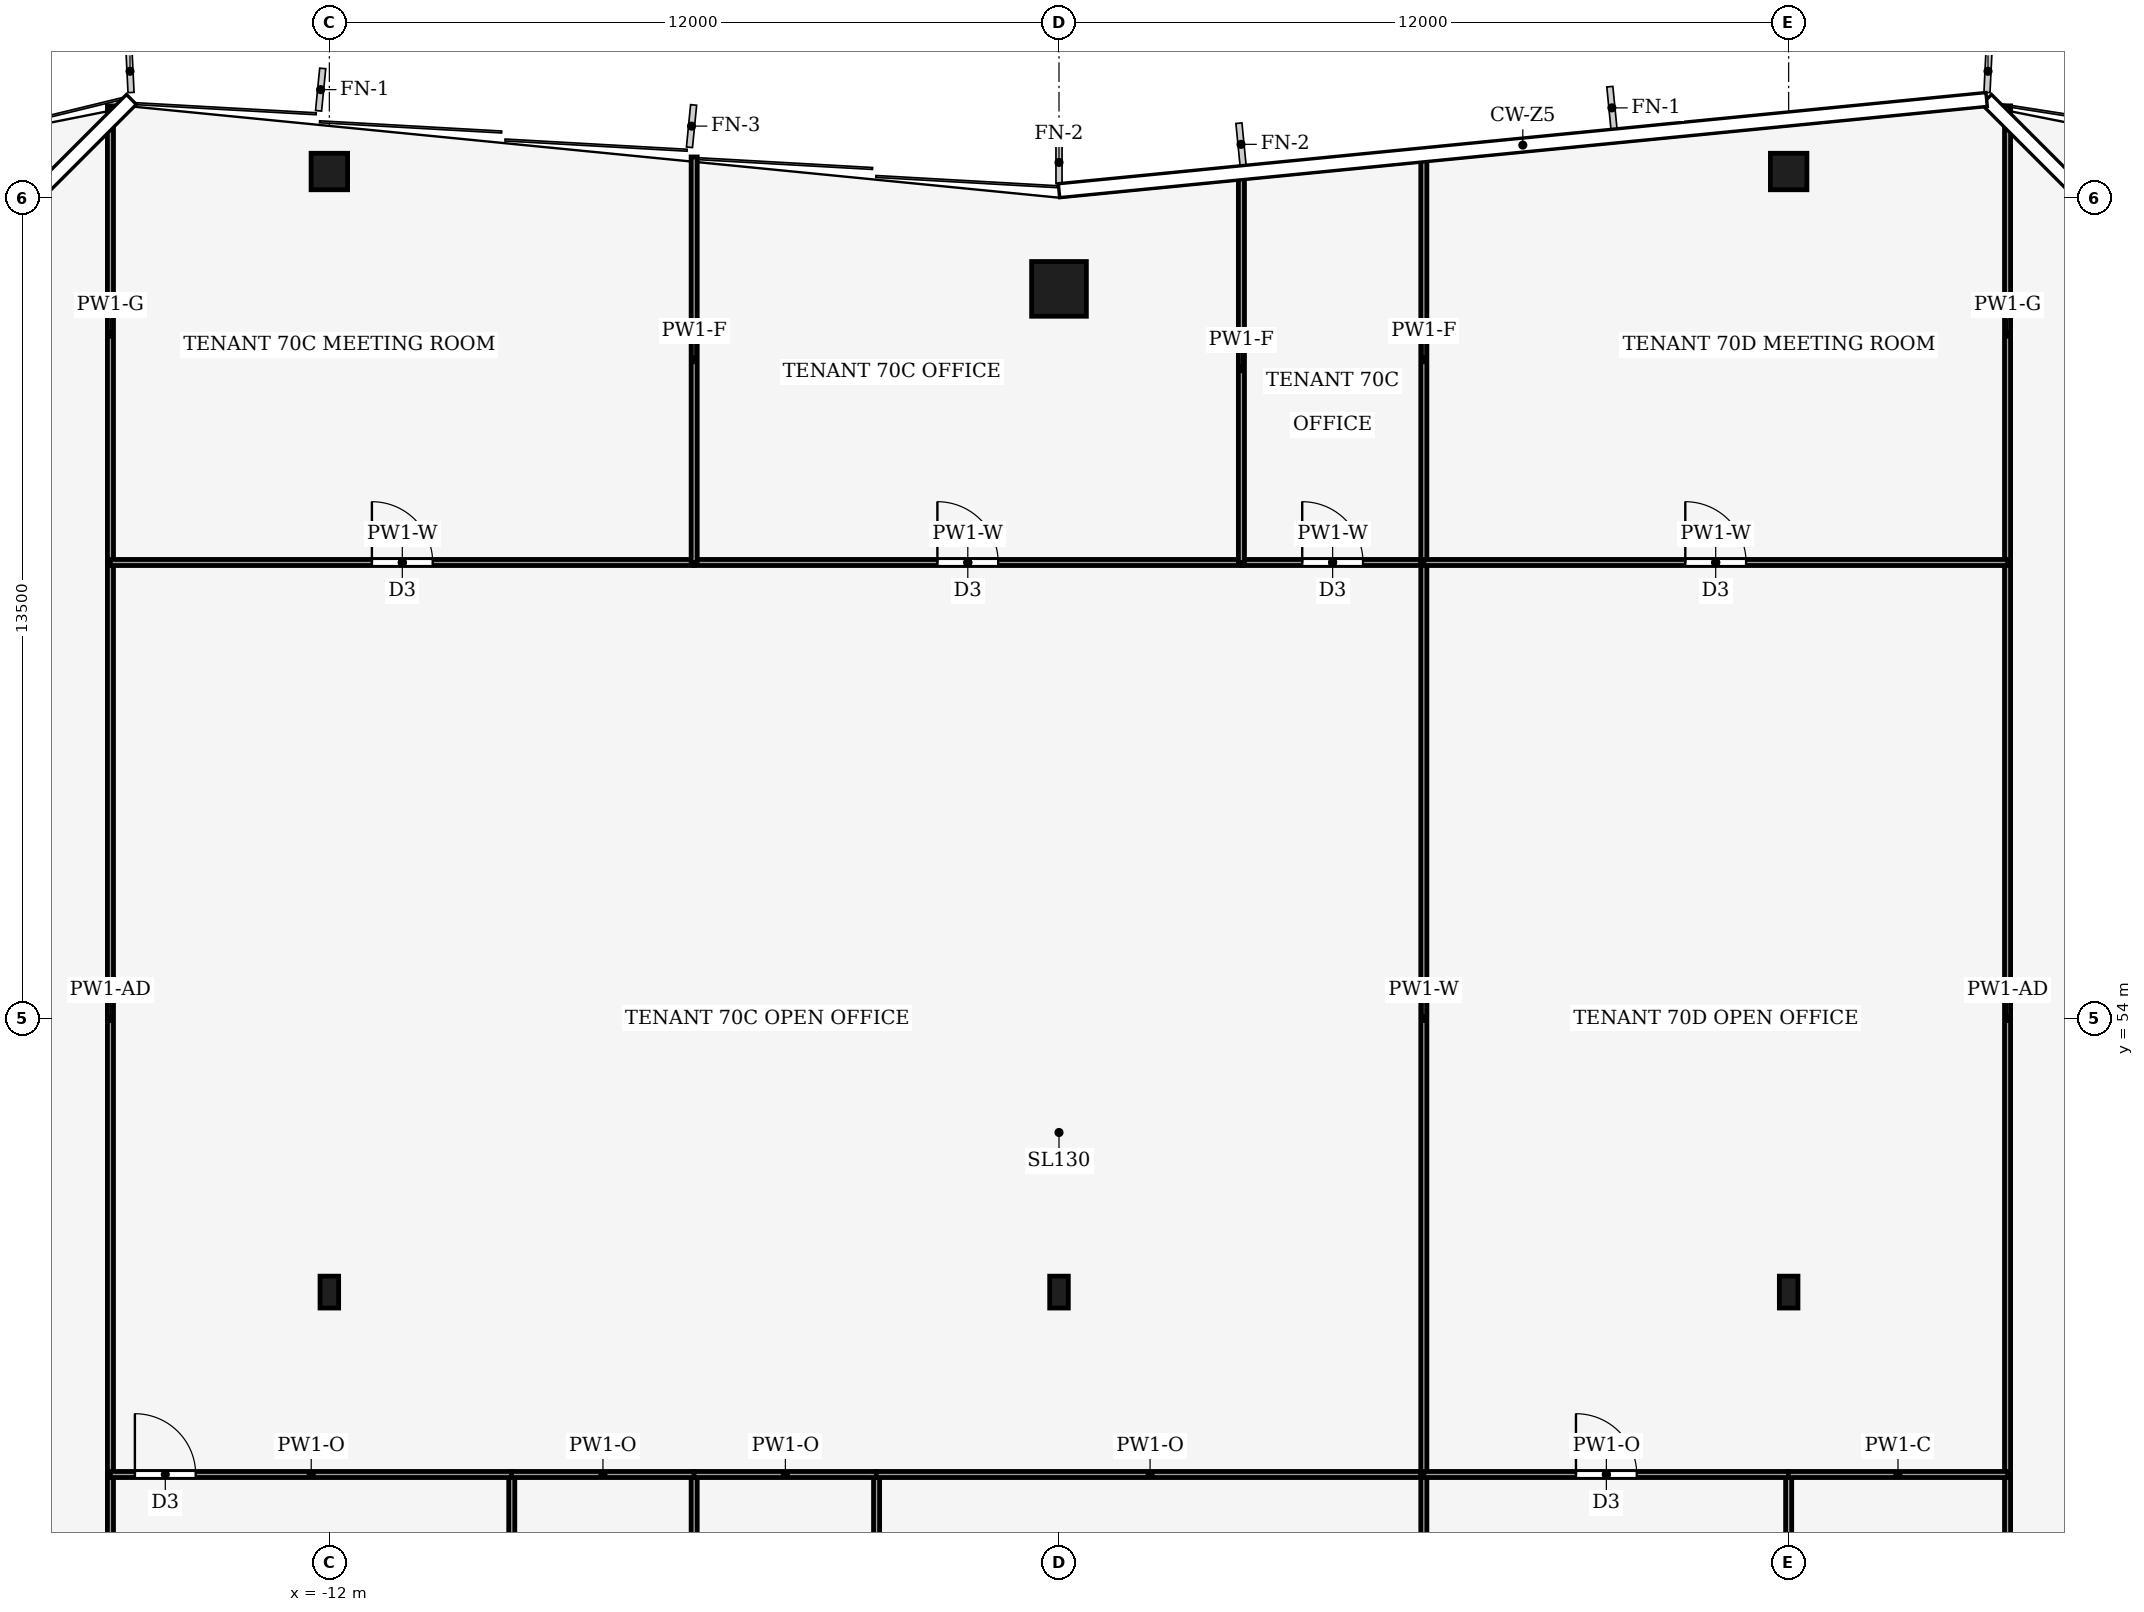
"""IFC4 building model, lengths in metres.
Left out: names, types, materials, properties, quantities, classifications, styles, units other than length and angle.
Written with IfcOpenShell. Run it as: python <this file> out.ifc"""

import sys

from ifc_helpers import new_model, si_unit, direction, frame, frame_2d, origin, origin_2d, place, context, subcontext, project, spatial, rectangle, hollow_rectangle, i_section, extrude, element, fill, save


model = new_model("IFC4")
c1 = context("Model", 3, precision=1e-05, world=origin(), true_north=direction((0.0, 1.0)))
c2 = subcontext(c1, "Body", "Model", "MODEL_VIEW")
j1 = project(units=[si_unit("LENGTHUNIT", "METRE"), si_unit("PLANEANGLEUNIT", "RADIAN")], contexts=[c1])
p1 = place(None, origin())
s1 = spatial("IfcSite", under=j1, at=p1, CompositionType="ELEMENT")
p2 = place(p1, origin())
s2 = spatial("IfcBuilding", under=s1, at=p2, CompositionType="ELEMENT")
p3 = place(p2, frame((0.0, 0.0, 306.0)))
s3 = spatial("IfcBuildingStorey", under=s2, at=p3, CompositionType="ELEMENT", Elevation=306.0)
p4 = place(p3, frame((0.0, 66.0, 0.0), z_axis=(0.0, 0.0, 1.0), x_axis=(1.0, 0.0, 0.0)))
e1 = element("IfcColumn", 1, at=p4, inside=s3, PredefinedType="COLUMN", context=c2, shape_type="SweptSolid", body=[
    extrude(hollow_rectangle(XDim=0.9, YDim=0.9, WallThickness=0.04, at=origin_2d()), origin(), (0.0, 0.0, 1.0), 4.0),
])
for number, where, z_axis, x_axis in (
    (2, (-12.0, 67.93, 0.0), (0.0, 0.0, 1.0), (1.0, 0.0, 0.0)),
    (3, (12.0, 67.93, 0.0), (0.0, 0.0, 1.0), (1.0, 0.0, 0.0)),
):
    element("IfcColumn", number, at=place(p3, frame(where, z_axis=z_axis, x_axis=x_axis)), inside=s3, PredefinedType="COLUMN", context=c2, shape_type="SweptSolid", body=[
        extrude(hollow_rectangle(XDim=0.6, YDim=0.6, WallThickness=0.025, at=origin_2d()), origin(), (0.0, 0.0, 1.0), 4.0),
    ])
for number, where, z_axis, x_axis in (
    (4, (-12.0, 49.5, 0.0), (0.0, 0.0, 1.0), (1.0, 0.0, 0.0)),
    (5, (0.0, 49.5, 0.0), (0.0, 0.0, 1.0), (1.0, 0.0, 0.0)),
    (6, (12.0, 49.5, 0.0), (0.0, 0.0, 1.0), (1.0, 0.0, 0.0)),
):
    element("IfcColumn", number, at=place(p3, frame(where, z_axis=z_axis, x_axis=x_axis)), inside=s3, PredefinedType="COLUMN", context=c2, shape_type="SweptSolid", body=[
        extrude(i_section(OverallWidth=0.306, OverallDepth=0.524, WebThickness=0.012, FlangeThickness=0.04, FilletRadius=0.027, at=origin_2d()), origin(), (0.0, 0.0, 1.0), 4.0),
    ])
p5 = place(p3, frame((-15.6, 40.6, 0.0), z_axis=(0.0, 0.0, 1.0), x_axis=(0.0, 1.0, 0.0)))
e7 = element("IfcWall", 7, at=p5, inside=s3, PredefinedType="PARTITIONING", context=c2, shape_type="SweptSolid", body=[
    extrude(rectangle(XDim=5.9, YDim=0.1, at=frame_2d((2.95, 0.0))), origin(), (0.0, 0.0, 1.0), 3.87),
])
p6 = place(p3, frame((-15.6, 46.5, 0.0), z_axis=(0.0, 0.0, 1.0), x_axis=(0.0, 1.0, 0.0)))
e8 = element("IfcWall", 8, at=p6, inside=s3, PredefinedType="PARTITIONING", context=c2, shape_type="SweptSolid", body=[
    extrude(rectangle(XDim=15.0, YDim=0.1, at=frame_2d((7.5, 0.0))), origin(), (0.0, 0.0, 1.0), 3.35),
])
p7 = place(p3, frame((-15.6, 61.5, 0.0), z_axis=(0.0, 0.0, 1.0), x_axis=(0.0, 1.0, 0.0)))
e9 = element("IfcWall", 9, at=p7, inside=s3, PredefinedType="PARTITIONING", context=c2, shape_type="SweptSolid", body=[
    extrude(rectangle(XDim=7.51, YDim=0.1, at=frame_2d((3.755, 0.0))), origin(), (0.0, 0.0, 1.0), 2.93),
])
p8 = place(p3, frame((15.6, 46.5, 0.0), z_axis=(0.0, 0.0, 1.0), x_axis=(0.0, -1.0, 0.0)))
e10 = element("IfcWall", 10, at=p8, inside=s3, PredefinedType="PARTITIONING", context=c2, shape_type="SweptSolid", body=[
    extrude(rectangle(XDim=5.9, YDim=0.1, at=frame_2d((2.95, 0.0))), origin(), (0.0, 0.0, 1.0), 3.87),
])
p9 = place(p3, frame((15.6, 61.5, 0.0), z_axis=(0.0, 0.0, 1.0), x_axis=(0.0, -1.0, 0.0)))
e11 = element("IfcWall", 11, at=p9, inside=s3, PredefinedType="PARTITIONING", context=c2, shape_type="SweptSolid", body=[
    extrude(rectangle(XDim=15.0, YDim=0.1, at=frame_2d((7.5, 0.0))), origin(), (0.0, 0.0, 1.0), 3.35),
])
p10 = place(p3, frame((15.6, 69.01, 0.0), z_axis=(0.0, 0.0, 1.0), x_axis=(0.0, -1.0, 0.0)))
e12 = element("IfcWall", 12, at=p10, inside=s3, PredefinedType="PARTITIONING", context=c2, shape_type="SweptSolid", body=[
    extrude(rectangle(XDim=7.51, YDim=0.1, at=frame_2d((3.755, 0.0))), origin(), (0.0, 0.0, 1.0), 2.93),
])
p11 = place(p3, frame((-9.0, 46.5, 0.0), z_axis=(0.0, 0.0, 1.0), x_axis=(0.0, -1.0, 0.0)))
e13 = element("IfcWall", 13, at=p11, inside=s3, PredefinedType="PARTITIONING", context=c2, shape_type="SweptSolid", body=[
    extrude(rectangle(XDim=5.9, YDim=0.1, at=frame_2d((2.95, 0.0))), origin(), (0.0, 0.0, 1.0), 3.87),
])
p12 = place(p11, frame((2.45, 0.0, 0.0)))
e14 = element("IfcOpeningElement", 14, at=p12, cuts=e13, PredefinedType="OPENING", context=c2, shape_type="SweptSolid", body=[
    extrude(rectangle(XDim=1.0, YDim=2.1, at=frame_2d((0.5, 1.05))), frame((0.0, 0.06, 0.0), z_axis=(0.0, -1.0, 0.0), x_axis=(1.0, 0.0, 0.0)), (0.0, 0.0, 1.0), 0.12),
])
p13 = place(p3, frame((-15.6, 46.5, 0.0), z_axis=(0.0, 0.0, 1.0), x_axis=(1.0, 0.0, 0.0)))
e15 = element("IfcWall", 15, at=p13, inside=s3, PredefinedType="PARTITIONING", context=c2, shape_type="SweptSolid", body=[
    extrude(rectangle(XDim=6.604, YDim=0.1, at=frame_2d((3.302, 0.0))), origin(), (0.0, 0.0, 1.0), 3.39),
])
p14 = place(p13, frame((0.402, 0.0, 0.0)))
e16 = element("IfcOpeningElement", 16, at=p14, cuts=e15, PredefinedType="OPENING", context=c2, shape_type="SweptSolid", body=[
    extrude(rectangle(XDim=1.0, YDim=2.1, at=frame_2d((0.5, 1.05))), frame((0.0, 0.06, 0.0), z_axis=(0.0, -1.0, 0.0), x_axis=(1.0, 0.0, 0.0)), (0.0, 0.0, 1.0), 0.12),
])
p15 = place(p3, frame((-6.0, 46.5, 0.0), z_axis=(0.0, 0.0, 1.0), x_axis=(0.0, -1.0, 0.0)))
e17 = element("IfcWall", 17, at=p15, inside=s3, PredefinedType="PARTITIONING", context=c2, shape_type="SweptSolid", body=[
    extrude(rectangle(XDim=5.9, YDim=0.1, at=frame_2d((2.95, 0.0))), origin(), (0.0, 0.0, 1.0), 3.87),
])
p16 = place(p15, frame((2.45, 0.0, 0.0)))
e18 = element("IfcOpeningElement", 18, at=p16, cuts=e17, PredefinedType="OPENING", context=c2, shape_type="SweptSolid", body=[
    extrude(rectangle(XDim=1.0, YDim=2.1, at=frame_2d((0.5, 1.05))), frame((0.0, 0.06, 0.0), z_axis=(0.0, -1.0, 0.0), x_axis=(1.0, 0.0, 0.0)), (0.0, 0.0, 1.0), 0.12),
])
p17 = place(p3, frame((-5.996, 46.5, 0.0), z_axis=(0.0, 0.0, 1.0), x_axis=(-1.0, 0.0, 0.0)))
e19 = element("IfcWall", 19, at=p17, inside=s3, PredefinedType="PARTITIONING", context=c2, shape_type="SweptSolid", body=[
    extrude(rectangle(XDim=3.008, YDim=0.1, at=frame_2d((1.504, 0.0))), origin(), (0.0, 0.0, 1.0), 3.39),
])
p18 = place(p3, frame((-3.0, 40.6, 0.0), z_axis=(0.0, 0.0, 1.0), x_axis=(0.0, 1.0, 0.0)))
e20 = element("IfcWall", 20, at=p18, inside=s3, PredefinedType="PARTITIONING", context=c2, shape_type="SweptSolid", body=[
    extrude(rectangle(XDim=5.9, YDim=0.1, at=frame_2d((2.95, 0.0))), origin(), (0.0, 0.0, 1.0), 3.87),
])
p19 = place(p3, frame((-2.996, 46.5, 0.0), z_axis=(0.0, 0.0, 1.0), x_axis=(-1.0, 0.0, 0.0)))
e21 = element("IfcWall", 21, at=p19, inside=s3, PredefinedType="PARTITIONING", context=c2, shape_type="SweptSolid", body=[
    extrude(rectangle(XDim=3.008, YDim=0.1, at=frame_2d((1.504, 0.0))), origin(), (0.0, 0.0, 1.0), 3.39),
])
p20 = place(p3, frame((6.0, 46.5, 0.0), z_axis=(0.0, 0.0, 1.0), x_axis=(-1.0, 0.0, 0.0)))
e22 = element("IfcWall", 22, at=p20, inside=s3, PredefinedType="PARTITIONING", context=c2, shape_type="SweptSolid", body=[
    extrude(rectangle(XDim=9.004, YDim=0.1, at=frame_2d((4.502, 0.0))), origin(), (0.0, 0.0, 1.0), 3.39),
])
p21 = place(p3, frame((6.0, 40.6, 0.0), z_axis=(0.0, 0.0, 1.0), x_axis=(0.0, 1.0, 0.0)))
e23 = element("IfcWall", 23, at=p21, inside=s3, PredefinedType="PARTITIONING", context=c2, shape_type="SweptSolid", body=[
    extrude(rectangle(XDim=5.9, YDim=0.1, at=frame_2d((2.95, 0.0))), origin(), (0.0, 0.0, 1.0), 3.87),
])
p22 = place(p3, frame((-15.6, 61.5, 0.0), z_axis=(0.0, 0.0, 1.0), x_axis=(1.0, 0.0, 0.0)))
e24 = element("IfcWall", 24, at=p22, inside=s3, PredefinedType="PARTITIONING", context=c2, shape_type="SweptSolid", body=[
    extrude(rectangle(XDim=9.6, YDim=0.1, at=frame_2d((4.8, 0.0))), origin(), (0.0, 0.0, 1.0), 3.24),
])
p23 = place(p22, frame((4.3, 0.0, 0.0)))
e25 = element("IfcOpeningElement", 25, at=p23, cuts=e24, PredefinedType="OPENING", context=c2, shape_type="SweptSolid", body=[
    extrude(rectangle(XDim=1.0, YDim=2.1, at=frame_2d((0.5, 1.05))), frame((0.0, 0.06, 0.0), z_axis=(0.0, -1.0, 0.0), x_axis=(1.0, 0.0, 0.0)), (0.0, 0.0, 1.0), 0.12),
])
p24 = place(p3, frame((-6.0, 61.5, 0.0), z_axis=(0.0, 0.0, 1.0), x_axis=(1.0, 0.0, 0.0)))
e26 = element("IfcWall", 26, at=p24, inside=s3, PredefinedType="PARTITIONING", context=c2, shape_type="SweptSolid", body=[
    extrude(rectangle(XDim=9.0, YDim=0.1, at=frame_2d((4.5, 0.0))), origin(), (0.0, 0.0, 1.0), 3.24),
])
p25 = place(p24, frame((4.0, 0.0, 0.0)))
e27 = element("IfcOpeningElement", 27, at=p25, cuts=e26, PredefinedType="OPENING", context=c2, shape_type="SweptSolid", body=[
    extrude(rectangle(XDim=1.0, YDim=2.1, at=frame_2d((0.5, 1.05))), frame((0.0, 0.06, 0.0), z_axis=(0.0, -1.0, 0.0), x_axis=(1.0, 0.0, 0.0)), (0.0, 0.0, 1.0), 0.12),
])
p26 = place(p3, frame((3.0, 61.5, 0.0), z_axis=(0.0, 0.0, 1.0), x_axis=(1.0, 0.0, 0.0)))
e28 = element("IfcWall", 28, at=p26, inside=s3, PredefinedType="PARTITIONING", context=c2, shape_type="SweptSolid", body=[
    extrude(rectangle(XDim=3.0, YDim=0.1, at=frame_2d((1.5, 0.0))), origin(), (0.0, 0.0, 1.0), 3.24),
])
p27 = place(p26, frame((1.0, 0.0, 0.0)))
e29 = element("IfcOpeningElement", 29, at=p27, cuts=e28, PredefinedType="OPENING", context=c2, shape_type="SweptSolid", body=[
    extrude(rectangle(XDim=1.0, YDim=2.1, at=frame_2d((0.5, 1.05))), frame((0.0, 0.06, 0.0), z_axis=(0.0, -1.0, 0.0), x_axis=(1.0, 0.0, 0.0)), (0.0, 0.0, 1.0), 0.12),
])
p28 = place(p3, frame((6.0, 46.5, 0.0), z_axis=(0.0, 0.0, 1.0), x_axis=(0.0, 1.0, 0.0)))
e30 = element("IfcWall", 30, at=p28, inside=s3, PredefinedType="PARTITIONING", context=c2, shape_type="SweptSolid", body=[
    extrude(rectangle(XDim=15.0, YDim=0.1, at=frame_2d((7.5, 0.0))), origin(), (0.0, 0.0, 1.0), 3.24),
])
p29 = place(p3, frame((-6.0, 61.5, 0.0), z_axis=(0.0, 0.0, 1.0), x_axis=(0.0, 1.0, 0.0)))
e31 = element("IfcWall", 31, at=p29, inside=s3, PredefinedType="PARTITIONING", context=c2, shape_type="SweptSolid", body=[
    extrude(rectangle(XDim=6.67, YDim=0.1, at=frame_2d((3.335, 0.0))), origin(), (0.0, 0.0, 1.0), 3.04),
])
p30 = place(p3, frame((3.0, 61.5, 0.0), z_axis=(0.0, 0.0, 1.0), x_axis=(0.0, 1.0, 0.0)))
e32 = element("IfcWall", 32, at=p30, inside=s3, PredefinedType="PARTITIONING", context=c2, shape_type="SweptSolid", body=[
    extrude(rectangle(XDim=6.375, YDim=0.1, at=frame_2d((3.188, 0.0))), origin(), (0.0, 0.0, 1.0), 3.04),
])
p31 = place(p3, frame((6.0, 61.5, 0.0), z_axis=(0.0, 0.0, 1.0), x_axis=(0.0, 1.0, 0.0)))
e33 = element("IfcWall", 33, at=p31, inside=s3, PredefinedType="PARTITIONING", context=c2, shape_type="SweptSolid", body=[
    extrude(rectangle(XDim=6.67, YDim=0.1, at=frame_2d((3.335, 0.0))), origin(), (0.0, 0.0, 1.0), 3.04),
])
p32 = place(p3, frame((12.0, 46.5, 0.0), z_axis=(0.0, 0.0, 1.0), x_axis=(0.0, -1.0, 0.0)))
e34 = element("IfcWall", 34, at=p32, inside=s3, PredefinedType="PARTITIONING", context=c2, shape_type="SweptSolid", body=[
    extrude(rectangle(XDim=5.9, YDim=0.1, at=frame_2d((2.95, 0.0))), origin(), (0.0, 0.0, 1.0), 3.39),
])
p33 = place(p32, frame((2.45, 0.0, 0.0)))
e35 = element("IfcOpeningElement", 35, at=p33, cuts=e34, PredefinedType="OPENING", context=c2, shape_type="SweptSolid", body=[
    extrude(rectangle(XDim=1.0, YDim=2.1, at=frame_2d((0.5, 1.05))), frame((0.0, 0.06, 0.0), z_axis=(0.0, -1.0, 0.0), x_axis=(1.0, 0.0, 0.0)), (0.0, 0.0, 1.0), 0.12),
])
p34 = place(p3, frame((6.0, 46.5, 0.0), z_axis=(0.0, 0.0, 1.0), x_axis=(1.0, 0.0, 0.0)))
e36 = element("IfcWall", 36, at=p34, inside=s3, PredefinedType="PARTITIONING", context=c2, shape_type="SweptSolid", body=[
    extrude(rectangle(XDim=6.004, YDim=0.1, at=frame_2d((3.002, 0.0))), origin(), (0.0, 0.0, 1.0), 3.39),
])
p35 = place(p34, frame((2.502, 0.0, 0.0)))
e37 = element("IfcOpeningElement", 37, at=p35, cuts=e36, PredefinedType="OPENING", context=c2, shape_type="SweptSolid", body=[
    extrude(rectangle(XDim=1.0, YDim=2.1, at=frame_2d((0.5, 1.05))), frame((0.0, 0.06, 0.0), z_axis=(0.0, -1.0, 0.0), x_axis=(1.0, 0.0, 0.0)), (0.0, 0.0, 1.0), 0.12),
])
p36 = place(p3, frame((15.6, 46.5, 0.0), z_axis=(0.0, 0.0, 1.0), x_axis=(-1.0, 0.0, 0.0)))
e38 = element("IfcWall", 38, at=p36, inside=s3, PredefinedType="PARTITIONING", context=c2, shape_type="SweptSolid", body=[
    extrude(rectangle(XDim=3.604, YDim=0.1, at=frame_2d((1.802, 0.0))), origin(), (0.0, 0.0, 1.0), 3.87),
])
p37 = place(p3, frame((6.0, 61.5, 0.0), z_axis=(0.0, 0.0, 1.0), x_axis=(1.0, 0.0, 0.0)))
e39 = element("IfcWall", 39, at=p37, inside=s3, PredefinedType="PARTITIONING", context=c2, shape_type="SweptSolid", body=[
    extrude(rectangle(XDim=9.6, YDim=0.1, at=frame_2d((4.8, 0.0))), origin(), (0.0, 0.0, 1.0), 3.24),
])
p38 = place(p37, frame((4.3, 0.0, 0.0)))
e40 = element("IfcOpeningElement", 40, at=p38, cuts=e39, PredefinedType="OPENING", context=c2, shape_type="SweptSolid", body=[
    extrude(rectangle(XDim=1.0, YDim=2.1, at=frame_2d((0.5, 1.05))), frame((0.0, 0.06, 0.0), z_axis=(0.0, -1.0, 0.0), x_axis=(1.0, 0.0, 0.0)), (0.0, 0.0, 1.0), 0.12),
])
p39 = place(p14, origin())
e41 = element("IfcDoor", 41, at=p39, inside=s3, OperationType="SINGLE_SWING_LEFT", PredefinedType="DOOR", context=c2, shape_type="SweptSolid", body=[
    extrude(rectangle(XDim=1.0, YDim=2.1, at=frame_2d((0.5, 1.05))), frame((0.0, 0.025, 0.0), z_axis=(0.0, -1.0, 0.0), x_axis=(1.0, 0.0, 0.0)), (0.0, 0.0, 1.0), 0.05),
])
fill(e16, e41)
p40 = place(p23, origin())
e42 = element("IfcDoor", 42, at=p40, inside=s3, OperationType="SINGLE_SWING_RIGHT", PredefinedType="DOOR", context=c2, shape_type="SweptSolid", body=[
    extrude(rectangle(XDim=1.0, YDim=2.1, at=frame_2d((0.5, 1.05))), frame((0.0, 0.025, 0.0), z_axis=(0.0, -1.0, 0.0), x_axis=(1.0, 0.0, 0.0)), (0.0, 0.0, 1.0), 0.05),
])
fill(e25, e42)
p41 = place(p25, origin())
e43 = element("IfcDoor", 43, at=p41, inside=s3, OperationType="SINGLE_SWING_LEFT", PredefinedType="DOOR", context=c2, shape_type="SweptSolid", body=[
    extrude(rectangle(XDim=1.0, YDim=2.1, at=frame_2d((0.5, 1.05))), frame((0.0, 0.025, 0.0), z_axis=(0.0, -1.0, 0.0), x_axis=(1.0, 0.0, 0.0)), (0.0, 0.0, 1.0), 0.05),
])
fill(e27, e43)
p42 = place(p27, origin())
e44 = element("IfcDoor", 44, at=p42, inside=s3, OperationType="SINGLE_SWING_RIGHT", PredefinedType="DOOR", context=c2, shape_type="SweptSolid", body=[
    extrude(rectangle(XDim=1.0, YDim=2.1, at=frame_2d((0.5, 1.05))), frame((0.0, 0.025, 0.0), z_axis=(0.0, -1.0, 0.0), x_axis=(1.0, 0.0, 0.0)), (0.0, 0.0, 1.0), 0.05),
])
fill(e29, e44)
p43 = place(p35, origin())
e45 = element("IfcDoor", 45, at=p43, inside=s3, OperationType="SINGLE_SWING_RIGHT", PredefinedType="DOOR", context=c2, shape_type="SweptSolid", body=[
    extrude(rectangle(XDim=1.0, YDim=2.1, at=frame_2d((0.5, 1.05))), frame((0.0, 0.025, 0.0), z_axis=(0.0, -1.0, 0.0), x_axis=(1.0, 0.0, 0.0)), (0.0, 0.0, 1.0), 0.05),
])
fill(e37, e45)
p44 = place(p38, origin())
e46 = element("IfcDoor", 46, at=p44, inside=s3, OperationType="SINGLE_SWING_LEFT", PredefinedType="DOOR", context=c2, shape_type="SweptSolid", body=[
    extrude(rectangle(XDim=1.0, YDim=2.1, at=frame_2d((0.5, 1.05))), frame((0.0, 0.025, 0.0), z_axis=(0.0, -1.0, 0.0), x_axis=(1.0, 0.0, 0.0)), (0.0, 0.0, 1.0), 0.05),
])
fill(e40, e46)
save(model, sys.argv[1])
